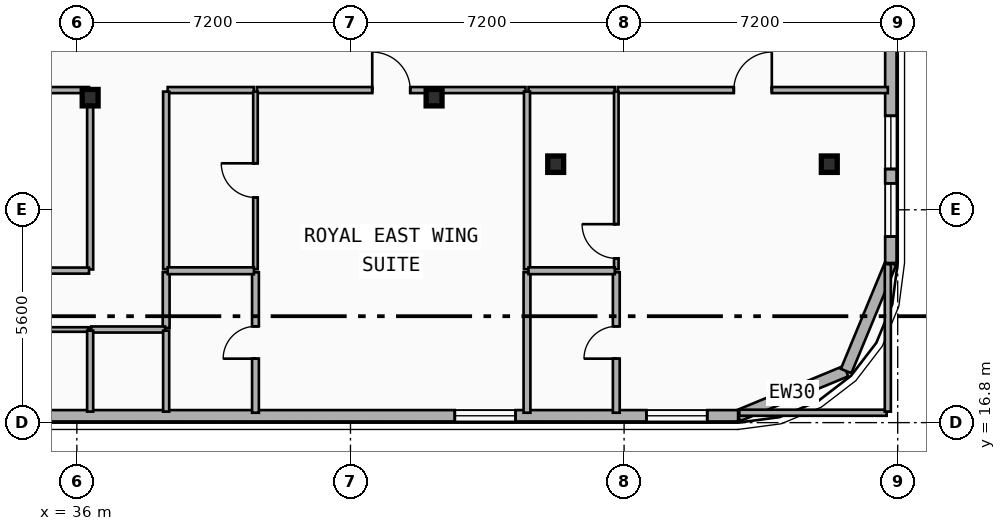
"""IFC4 building model, lengths in metres.
Left out: names, types, materials, properties, quantities, classifications, styles, units other than length and angle.
Written with IfcOpenShell. Run it as: python <this file> out.ifc"""

import sys

from ifc_helpers import new_model, si_unit, direction, frame, frame_2d, origin, origin_2d, place, context, subcontext, project, spatial, rectangle, i_section, extrude, element, fill, save


model = new_model("IFC4")
c1 = context("Model", 3, precision=1e-05, world=origin(), true_north=direction((0.0, 1.0)))
c2 = subcontext(c1, "Body", "Model", "MODEL_VIEW")
j1 = project(units=[si_unit("LENGTHUNIT", "METRE"), si_unit("PLANEANGLEUNIT", "RADIAN")], contexts=[c1])
p1 = place(None, origin())
s1 = spatial("IfcSite", under=j1, at=p1, CompositionType="ELEMENT")
p2 = place(p1, origin())
s2 = spatial("IfcBuilding", under=s1, at=p2, CompositionType="ELEMENT")
p3 = place(p2, frame((0.0, 0.0, 129.3)))
s3 = spatial("IfcBuildingStorey", under=s2, at=p3, CompositionType="ELEMENT", Elevation=129.3)
for number, where, z_axis, x_axis in (
    (1, (36.35, 25.35, 0.0), (0.0, 0.0, 1.0), (1.0, 0.0, 0.0)),
    (2, (45.4, 25.35, 0.0), (0.0, 0.0, 1.0), (1.0, 0.0, 0.0)),
    (3, (48.6, 23.6, 0.0), (0.0, 0.0, 1.0), (1.0, 0.0, 0.0)),
    (4, (55.8, 23.6, 0.0), (0.0, 0.0, 1.0), (1.0, 0.0, 0.0)),
):
    element("IfcColumn", number, at=place(p3, frame(where, z_axis=z_axis, x_axis=x_axis)), inside=s3, PredefinedType="COLUMN", context=c2, shape_type="SweptSolid", body=[
        extrude(i_section(OverallWidth=0.418, OverallDepth=0.432, WebThickness=0.035, FlangeThickness=0.056, FilletRadius=0.015, at=origin_2d()), origin(), (0.0, 0.0, 1.0), 3.6),
    ])
p4 = place(p3, frame((56.243, 18.157, 0.0), z_axis=(0.0, 0.0, 1.0), x_axis=(-0.923882414032, -0.382676475685, 0.0)))
e5 = element("IfcWall", 5, at=p4, inside=s3, PredefinedType="SOLIDWALL", context=c2, shape_type="SweptSolid", body=[
    extrude(rectangle(XDim=3.077, YDim=0.3, at=frame_2d((1.539, 0.0))), origin(), (0.0, 0.0, 1.0), 3.28),
])
p5 = place(p3, frame((57.42, 21.0, 0.0), z_axis=(0.0, 0.0, 1.0), x_axis=(-0.382636798336, -0.92389884758, 0.0)))
e6 = element("IfcWall", 6, at=p5, inside=s3, PredefinedType="SOLIDWALL", context=c2, shape_type="SweptSolid", body=[
    extrude(rectangle(XDim=3.077, YDim=0.3, at=frame_2d((1.538, 0.0))), origin(), (0.0, 0.0, 1.0), 3.28),
])
p6 = place(p3, frame((57.42, 39.0, 0.0), z_axis=(0.0, 0.0, 1.0), x_axis=(0.0, -1.0, 0.0)))
e7 = element("IfcWall", 7, at=p6, inside=s3, PredefinedType="SOLIDWALL", context=c2, shape_type="SweptSolid", body=[
    extrude(rectangle(XDim=18.0, YDim=0.3, at=frame_2d((9.0, 0.0))), origin(), (0.0, 0.0, 1.0), 3.28),
])
p7 = place(p6, frame((8.882, 0.0, 0.65)))
e8 = element("IfcOpeningElement", 8, at=p7, cuts=e7, PredefinedType="OPENING", context=c2, shape_type="SweptSolid", body=[
    extrude(rectangle(XDim=1.4, YDim=1.8, at=frame_2d((0.7, 0.9))), frame((0.0, 0.16, 0.0), z_axis=(0.0, -1.0, 0.0), x_axis=(1.0, 0.0, 0.0)), (0.0, 0.0, 1.0), 0.32),
])
p8 = place(p6, frame((3.621, 0.0, 0.65)))
e9 = element("IfcOpeningElement", 9, at=p8, cuts=e7, PredefinedType="OPENING", context=c2, shape_type="SweptSolid", body=[
    extrude(rectangle(XDim=1.4, YDim=1.8, at=frame_2d((0.7, 0.9))), frame((0.0, 0.16, 0.0), z_axis=(0.0, -1.0, 0.0), x_axis=(1.0, 0.0, 0.0)), (0.0, 0.0, 1.0), 0.32),
])
p9 = place(p6, frame((14.127, 0.0, 0.65)))
e10 = element("IfcOpeningElement", 10, at=p9, cuts=e7, PredefinedType="OPENING", context=c2, shape_type="SweptSolid", body=[
    extrude(rectangle(XDim=1.4, YDim=1.8, at=frame_2d((0.7, 0.9))), frame((0.0, 0.16, 0.0), z_axis=(0.0, -1.0, 0.0), x_axis=(1.0, 0.0, 0.0)), (0.0, 0.0, 1.0), 0.32),
])
p10 = place(p6, frame((15.903, 0.0, 0.65)))
e11 = element("IfcOpeningElement", 11, at=p10, cuts=e7, PredefinedType="OPENING", context=c2, shape_type="SweptSolid", body=[
    extrude(rectangle(XDim=1.4, YDim=1.8, at=frame_2d((0.7, 0.9))), frame((0.0, 0.16, 0.0), z_axis=(0.0, -1.0, 0.0), x_axis=(1.0, 0.0, 0.0)), (0.0, 0.0, 1.0), 0.32),
])
p11 = place(p3, frame((53.4, 16.98, 0.0), z_axis=(0.0, 0.0, 1.0), x_axis=(-1.0, 0.0, 0.0)))
e12 = element("IfcWall", 12, at=p11, inside=s3, PredefinedType="SOLIDWALL", context=c2, shape_type="SweptSolid", body=[
    extrude(rectangle(XDim=49.2, YDim=0.3, at=frame_2d((24.6, 0.0))), origin(), (0.0, 0.0, 1.0), 3.28),
])
p12 = place(p11, frame((43.85, 0.0, 0.65)))
e13 = element("IfcOpeningElement", 13, at=p12, cuts=e12, PredefinedType="OPENING", context=c2, shape_type="SweptSolid", body=[
    extrude(rectangle(XDim=1.6, YDim=1.95, at=frame_2d((0.8, 0.975))), frame((0.0, 0.16, 0.0), z_axis=(0.0, -1.0, 0.0), x_axis=(1.0, 0.0, 0.0)), (0.0, 0.0, 1.0), 0.32),
])
p13 = place(p11, frame((38.628, 0.0, 0.65)))
e14 = element("IfcOpeningElement", 14, at=p13, cuts=e12, PredefinedType="OPENING", context=c2, shape_type="SweptSolid", body=[
    extrude(rectangle(XDim=1.6, YDim=1.95, at=frame_2d((0.8, 0.975))), frame((0.0, 0.16, 0.0), z_axis=(0.0, -1.0, 0.0), x_axis=(1.0, 0.0, 0.0)), (0.0, 0.0, 1.0), 0.32),
])
p14 = place(p11, frame((28.7, 0.0, 0.8)))
e15 = element("IfcOpeningElement", 15, at=p14, cuts=e12, PredefinedType="OPENING", context=c2, shape_type="SweptSolid", body=[
    extrude(rectangle(XDim=1.6, YDim=1.95, at=frame_2d((0.8, 0.975))), frame((0.0, 0.16, 0.0), z_axis=(0.0, -1.0, 0.0), x_axis=(1.0, 0.0, 0.0)), (0.0, 0.0, 1.0), 0.32),
])
p15 = place(p11, frame((5.855, 0.0, 0.34)))
e16 = element("IfcOpeningElement", 16, at=p15, cuts=e12, PredefinedType="OPENING", context=c2, shape_type="SweptSolid", body=[
    extrude(rectangle(XDim=1.6, YDim=1.95, at=frame_2d((0.8, 0.975))), frame((0.0, 0.16, 0.0), z_axis=(0.0, -1.0, 0.0), x_axis=(1.0, 0.0, 0.0)), (0.0, 0.0, 1.0), 0.32),
])
p16 = place(p11, frame((0.812, 0.0, 0.65)))
e17 = element("IfcOpeningElement", 17, at=p16, cuts=e12, PredefinedType="OPENING", context=c2, shape_type="SweptSolid", body=[
    extrude(rectangle(XDim=1.6, YDim=1.95, at=frame_2d((0.8, 0.975))), frame((0.0, 0.16, 0.0), z_axis=(0.0, -1.0, 0.0), x_axis=(1.0, 0.0, 0.0)), (0.0, 0.0, 1.0), 0.32),
])
p17 = place(p3, frame((40.74, 25.55, 0.0), z_axis=(0.0, 0.0, 1.0), x_axis=(1.0, 0.0, 0.0)))
e18 = element("IfcWall", 18, at=p17, inside=s3, PredefinedType="PARTITIONING", context=c2, shape_type="SweptSolid", body=[
    extrude(rectangle(XDim=7.065, YDim=0.16, at=frame_2d((3.532, 0.0))), origin(), (0.0, 0.0, 1.0), 2.446),
])
p18 = place(p17, frame((3.032, 0.0, 0.0)))
e19 = element("IfcOpeningElement", 19, at=p18, cuts=e18, PredefinedType="OPENING", context=c2, shape_type="SweptSolid", body=[
    extrude(rectangle(XDim=1.0, YDim=2.15, at=frame_2d((0.5, 1.075))), frame((0.0, 0.09, 0.0), z_axis=(0.0, -1.0, 0.0), x_axis=(1.0, 0.0, 0.0)), (0.0, 0.0, 1.0), 0.18),
])
p19 = place(p3, frame((38.39, 25.55, 0.0), z_axis=(0.0, 0.0, 1.0), x_axis=(1.0, 0.0, 0.0)))
e20 = element("IfcWall", 20, at=p19, inside=s3, PredefinedType="PARTITIONING", context=c2, shape_type="SweptSolid", body=[
    extrude(rectangle(XDim=2.27, YDim=0.16, at=frame_2d((1.135, 0.0))), origin(), (0.0, 0.0, 1.0), 3.28),
])
p20 = place(p3, frame((50.235, 25.55, 0.0), z_axis=(0.0, 0.0, 1.0), x_axis=(1.0, 0.0, 0.0)))
e21 = element("IfcWall", 21, at=p20, inside=s3, PredefinedType="PARTITIONING", context=c2, shape_type="SweptSolid", body=[
    extrude(rectangle(XDim=7.105, YDim=0.16, at=frame_2d((3.552, 0.0))), origin(), (0.0, 0.0, 1.0), 2.61),
])
p21 = place(p20, frame((3.052, 0.0, 0.0)))
e22 = element("IfcOpeningElement", 22, at=p21, cuts=e21, PredefinedType="OPENING", context=c2, shape_type="SweptSolid", body=[
    extrude(rectangle(XDim=1.0, YDim=2.15, at=frame_2d((0.5, 1.075))), frame((0.0, 0.09, 0.0), z_axis=(0.0, -1.0, 0.0), x_axis=(1.0, 0.0, 0.0)), (0.0, 0.0, 1.0), 0.18),
])
p22 = place(p3, frame((47.885, 25.55, 0.0), z_axis=(0.0, 0.0, 1.0), x_axis=(1.0, 0.0, 0.0)))
e23 = element("IfcWall", 23, at=p22, inside=s3, PredefinedType="PARTITIONING", context=c2, shape_type="SweptSolid", body=[
    extrude(rectangle(XDim=2.27, YDim=0.16, at=frame_2d((1.135, 0.0))), origin(), (0.0, 0.0, 1.0), 2.61),
])
p23 = place(p3, frame((38.35, 19.29, 0.0), z_axis=(0.0, 0.0, 1.0), x_axis=(0.0, 1.0, 0.0)))
e24 = element("IfcWall", 24, at=p23, inside=s3, PredefinedType="PLUMBINGWALL", context=c2, shape_type="SweptSolid", body=[
    extrude(rectangle(XDim=1.466, YDim=0.18, at=frame_2d((0.733, 0.0))), origin(), (0.0, 0.0, 1.0), 2.87),
])
p24 = place(p3, frame((38.35, 20.836, 0.0), z_axis=(0.0, 0.0, 1.0), x_axis=(0.0, 1.0, 0.0)))
e25 = element("IfcWall", 25, at=p24, inside=s3, PredefinedType="PARTITIONING", context=c2, shape_type="SweptSolid", body=[
    extrude(rectangle(XDim=4.674, YDim=0.16, at=frame_2d((2.337, 0.0))), origin(), (0.0, 0.0, 1.0), 2.86),
])
p25 = place(p3, frame((22.84, 19.25, 0.0), z_axis=(0.0, 0.0, 1.0), x_axis=(1.0, 0.0, 0.0)))
e26 = element("IfcWall", 26, at=p25, inside=s3, PredefinedType="PARTITIONING", context=c2, shape_type="SweptSolid", body=[
    extrude(rectangle(XDim=13.47, YDim=0.12, at=frame_2d((6.735, 0.0))), origin(), (0.0, 0.0, 1.0), 2.446),
])
p26 = place(p25, frame((6.285, 0.0, 0.0)))
e27 = element("IfcOpeningElement", 27, at=p26, cuts=e26, PredefinedType="OPENING", context=c2, shape_type="SweptSolid", body=[
    extrude(rectangle(XDim=0.9, YDim=2.1, at=frame_2d((0.45, 1.05))), frame((0.0, 0.07, 0.0), z_axis=(0.0, -1.0, 0.0), x_axis=(1.0, 0.0, 0.0)), (0.0, 0.0, 1.0), 0.14),
])
p27 = place(p3, frame((40.7, 17.06, 0.0), z_axis=(0.0, 0.0, 1.0), x_axis=(0.0, 1.0, 0.0)))
e28 = element("IfcWall", 28, at=p27, inside=s3, PredefinedType="PLUMBINGWALL", context=c2, shape_type="SweptSolid", body=[
    extrude(rectangle(XDim=3.696, YDim=0.18, at=frame_2d((1.848, 0.0))), origin(), (0.0, 0.0, 1.0), 2.86),
])
p28 = place(p27, frame((1.423, 0.0, 0.0)))
e29 = element("IfcOpeningElement", 29, at=p28, cuts=e28, PredefinedType="OPENING", context=c2, shape_type="SweptSolid", body=[
    extrude(rectangle(XDim=0.85, YDim=2.1, at=frame_2d((0.425, 1.05))), frame((0.0, 0.1, 0.0), z_axis=(0.0, -1.0, 0.0), x_axis=(1.0, 0.0, 0.0)), (0.0, 0.0, 1.0), 0.2),
])
p29 = place(p3, frame((40.7, 20.836, 0.0), z_axis=(0.0, 0.0, 1.0), x_axis=(0.0, 1.0, 0.0)))
e30 = element("IfcWall", 30, at=p29, inside=s3, PredefinedType="PARTITIONING", context=c2, shape_type="SweptSolid", body=[
    extrude(rectangle(XDim=4.674, YDim=0.12, at=frame_2d((2.337, 0.0))), origin(), (0.0, 0.0, 1.0), 2.86),
])
p30 = place(p29, frame((1.887, 0.0, 0.0)))
e31 = element("IfcOpeningElement", 31, at=p30, cuts=e30, PredefinedType="OPENING", context=c2, shape_type="SweptSolid", body=[
    extrude(rectangle(XDim=0.9, YDim=2.1, at=frame_2d((0.45, 1.05))), frame((0.0, 0.07, 0.0), z_axis=(0.0, -1.0, 0.0), x_axis=(1.0, 0.0, 0.0)), (0.0, 0.0, 1.0), 0.14),
])
p31 = place(p3, frame((47.845, 17.06, 0.0), z_axis=(0.0, 0.0, 1.0), x_axis=(0.0, 1.0, 0.0)))
e32 = element("IfcWall", 32, at=p31, inside=s3, PredefinedType="PLUMBINGWALL", context=c2, shape_type="SweptSolid", body=[
    extrude(rectangle(XDim=3.696, YDim=0.18, at=frame_2d((1.848, 0.0))), origin(), (0.0, 0.0, 1.0), 2.96),
])
p32 = place(p3, frame((47.845, 20.836, 0.0), z_axis=(0.0, 0.0, 1.0), x_axis=(0.0, 1.0, 0.0)))
e33 = element("IfcWall", 33, at=p32, inside=s3, PredefinedType="PARTITIONING", context=c2, shape_type="SweptSolid", body=[
    extrude(rectangle(XDim=4.674, YDim=0.16, at=frame_2d((2.337, 0.0))), origin(), (0.0, 0.0, 1.0), 2.76),
])
p33 = place(p3, frame((38.39, 20.796, 0.0), z_axis=(0.0, 0.0, 1.0), x_axis=(1.0, 0.0, 0.0)))
e34 = element("IfcWall", 34, at=p33, inside=s3, PredefinedType="PLUMBINGWALL", context=c2, shape_type="SweptSolid", body=[
    extrude(rectangle(XDim=2.27, YDim=0.18, at=frame_2d((1.135, 0.0))), origin(), (0.0, 0.0, 1.0), 2.87),
])
p34 = place(p3, frame((50.195, 17.06, 0.0), z_axis=(0.0, 0.0, 1.0), x_axis=(0.0, 1.0, 0.0)))
e35 = element("IfcWall", 35, at=p34, inside=s3, PredefinedType="PLUMBINGWALL", context=c2, shape_type="SweptSolid", body=[
    extrude(rectangle(XDim=3.696, YDim=0.18, at=frame_2d((1.848, 0.0))), origin(), (0.0, 0.0, 1.0), 2.61),
])
p35 = place(p34, frame((1.423, 0.0, 0.0)))
e36 = element("IfcOpeningElement", 36, at=p35, cuts=e35, PredefinedType="OPENING", context=c2, shape_type="SweptSolid", body=[
    extrude(rectangle(XDim=0.85, YDim=2.1, at=frame_2d((0.425, 1.05))), frame((0.0, 0.1, 0.0), z_axis=(0.0, -1.0, 0.0), x_axis=(1.0, 0.0, 0.0)), (0.0, 0.0, 1.0), 0.2),
])
p36 = place(p3, frame((50.195, 20.836, 0.0), z_axis=(0.0, 0.0, 1.0), x_axis=(0.0, 1.0, 0.0)))
e37 = element("IfcWall", 37, at=p36, inside=s3, PredefinedType="PARTITIONING", context=c2, shape_type="SweptSolid", body=[
    extrude(rectangle(XDim=4.674, YDim=0.12, at=frame_2d((2.337, 0.0))), origin(), (0.0, 0.0, 1.0), 2.61),
])
p37 = place(p36, frame((0.286, 0.0, 0.0)))
e38 = element("IfcOpeningElement", 38, at=p37, cuts=e37, PredefinedType="OPENING", context=c2, shape_type="SweptSolid", body=[
    extrude(rectangle(XDim=0.9, YDim=2.1, at=frame_2d((0.45, 1.05))), frame((0.0, 0.07, 0.0), z_axis=(0.0, -1.0, 0.0), x_axis=(1.0, 0.0, 0.0)), (0.0, 0.0, 1.0), 0.14),
])
p38 = place(p3, frame((47.885, 20.796, 0.0), z_axis=(0.0, 0.0, 1.0), x_axis=(1.0, 0.0, 0.0)))
e39 = element("IfcWall", 39, at=p38, inside=s3, PredefinedType="PLUMBINGWALL", context=c2, shape_type="SweptSolid", body=[
    extrude(rectangle(XDim=2.27, YDim=0.18, at=frame_2d((1.135, 0.0))), origin(), (0.0, 0.0, 1.0), 2.61),
])
p39 = place(p3, frame((22.83, 25.55, 0.0), z_axis=(0.0, 0.0, 1.0), x_axis=(1.0, 0.0, 0.0)))
e40 = element("IfcWall", 40, at=p39, inside=s3, PredefinedType="PARTITIONING", context=c2, shape_type="SweptSolid", body=[
    extrude(rectangle(XDim=13.49, YDim=0.16, at=frame_2d((6.745, 0.0))), origin(), (0.0, 0.0, 1.0), 2.446),
])
p40 = place(p3, frame((36.38, 19.25, 0.0), z_axis=(0.0, 0.0, 1.0), x_axis=(1.0, 0.0, 0.0)))
e41 = element("IfcWall", 41, at=p40, inside=s3, PredefinedType="PARTITIONING", context=c2, shape_type="SweptSolid", body=[
    extrude(rectangle(XDim=1.94, YDim=0.16, at=frame_2d((0.97, 0.0))), origin(), (0.0, 0.0, 1.0), 2.446),
])
p41 = place(p3, frame((36.35, 20.83, 0.0), z_axis=(0.0, 0.0, 1.0), x_axis=(0.0, 1.0, 0.0)))
e42 = element("IfcWall", 42, at=p41, inside=s3, PredefinedType="PARTITIONING", context=c2, shape_type="SweptSolid", body=[
    extrude(rectangle(XDim=4.69, YDim=0.16, at=frame_2d((2.345, 0.0))), origin(), (0.0, 0.0, 1.0), 2.446),
])
p42 = place(p3, frame((34.48, 20.8, 0.0), z_axis=(0.0, 0.0, 1.0), x_axis=(1.0, 0.0, 0.0)))
e43 = element("IfcWall", 43, at=p42, inside=s3, PredefinedType="PARTITIONING", context=c2, shape_type="SweptSolid", body=[
    extrude(rectangle(XDim=1.84, YDim=0.16, at=frame_2d((0.92, 0.0))), origin(), (0.0, 0.0, 1.0), 2.446),
])
p43 = place(p3, frame((36.35, 17.09, 0.0), z_axis=(0.0, 0.0, 1.0), x_axis=(0.0, 1.0, 0.0)))
e44 = element("IfcWall", 44, at=p43, inside=s3, PredefinedType="PARTITIONING", context=c2, shape_type="SweptSolid", body=[
    extrude(rectangle(XDim=2.13, YDim=0.16, at=frame_2d((1.065, 0.0))), origin(), (0.0, 0.0, 1.0), 2.446),
])
p44 = place(p3, frame((38.35, 17.09, 0.0), z_axis=(0.0, 0.0, 1.0), x_axis=(0.0, 1.0, 0.0)))
e45 = element("IfcWall", 45, at=p44, inside=s3, PredefinedType="PARTITIONING", context=c2, shape_type="SweptSolid", body=[
    extrude(rectangle(XDim=2.13, YDim=0.16, at=frame_2d((1.065, 0.0))), origin(), (0.0, 0.0, 1.0), 2.86),
])
p45 = place(p3, frame((53.43, 17.06, 0.0), z_axis=(0.0, 0.0, 1.0), x_axis=(1.0, 0.0, 0.0)))
e46 = element("IfcWall", 46, at=p45, inside=s3, PredefinedType="PARTITIONING", context=c2, shape_type="SweptSolid", body=[
    extrude(rectangle(XDim=3.88, YDim=0.16, at=frame_2d((1.94, 0.0))), origin(), (0.0, 0.0, 1.0), 2.76),
])
p46 = place(p3, frame((57.34, 17.09, 0.0), z_axis=(0.0, 0.0, 1.0), x_axis=(0.0, 1.0, 0.0)))
e47 = element("IfcWall", 47, at=p46, inside=s3, PredefinedType="PARTITIONING", context=c2, shape_type="SweptSolid", body=[
    extrude(rectangle(XDim=3.88, YDim=0.16, at=frame_2d((1.94, 0.0))), origin(), (0.0, 0.0, 1.0), 3.28),
])
p47 = place(p9, origin())
e48 = element("IfcWindow", 48, at=p47, inside=s3, PartitioningType="SINGLE_PANEL", PredefinedType="WINDOW", context=c2, shape_type="SweptSolid", body=[
    extrude(rectangle(XDim=1.4, YDim=1.8, at=frame_2d((0.7, 0.9))), frame((0.0, 0.03, 0.0), z_axis=(0.0, -1.0, 0.0), x_axis=(1.0, 0.0, 0.0)), (0.0, 0.0, 1.0), 0.06),
])
fill(e10, e48)
p48 = place(p10, origin())
e49 = element("IfcWindow", 49, at=p48, inside=s3, PartitioningType="SINGLE_PANEL", PredefinedType="WINDOW", context=c2, shape_type="SweptSolid", body=[
    extrude(rectangle(XDim=1.4, YDim=1.8, at=frame_2d((0.7, 0.9))), frame((0.0, 0.03, 0.0), z_axis=(0.0, -1.0, 0.0), x_axis=(1.0, 0.0, 0.0)), (0.0, 0.0, 1.0), 0.06),
])
fill(e11, e49)
p49 = place(p15, origin())
e50 = element("IfcWindow", 50, at=p49, inside=s3, PartitioningType="SINGLE_PANEL", PredefinedType="WINDOW", context=c2, shape_type="SweptSolid", body=[
    extrude(rectangle(XDim=1.6, YDim=1.95, at=frame_2d((0.8, 0.975))), frame((0.0, 0.03, 0.0), z_axis=(0.0, -1.0, 0.0), x_axis=(1.0, 0.0, 0.0)), (0.0, 0.0, 1.0), 0.06),
])
fill(e16, e50)
p50 = place(p16, origin())
e51 = element("IfcWindow", 51, at=p50, inside=s3, PartitioningType="SINGLE_PANEL", PredefinedType="WINDOW", context=c2, shape_type="SweptSolid", body=[
    extrude(rectangle(XDim=1.6, YDim=1.95, at=frame_2d((0.8, 0.975))), frame((0.0, 0.03, 0.0), z_axis=(0.0, -1.0, 0.0), x_axis=(1.0, 0.0, 0.0)), (0.0, 0.0, 1.0), 0.06),
])
fill(e17, e51)
p51 = place(p18, origin())
e52 = element("IfcDoor", 52, at=p51, inside=s3, OperationType="SINGLE_SWING_LEFT", PredefinedType="DOOR", context=c2, shape_type="SweptSolid", body=[
    extrude(rectangle(XDim=1.0, YDim=2.15, at=frame_2d((0.5, 1.075))), frame((0.0, 0.025, 0.0), z_axis=(0.0, -1.0, 0.0), x_axis=(1.0, 0.0, 0.0)), (0.0, 0.0, 1.0), 0.05),
])
fill(e19, e52)
p52 = place(p21, origin())
e53 = element("IfcDoor", 53, at=p52, inside=s3, OperationType="SINGLE_SWING_RIGHT", PredefinedType="DOOR", context=c2, shape_type="SweptSolid", body=[
    extrude(rectangle(XDim=1.0, YDim=2.15, at=frame_2d((0.5, 1.075))), frame((0.0, 0.025, 0.0), z_axis=(0.0, -1.0, 0.0), x_axis=(1.0, 0.0, 0.0)), (0.0, 0.0, 1.0), 0.05),
])
fill(e22, e53)
p53 = place(p28, origin())
e54 = element("IfcDoor", 54, at=p53, inside=s3, OperationType="SINGLE_SWING_LEFT", PredefinedType="DOOR", context=c2, shape_type="SweptSolid", body=[
    extrude(rectangle(XDim=0.85, YDim=2.1, at=frame_2d((0.425, 1.05))), frame((0.0, 0.025, 0.0), z_axis=(0.0, -1.0, 0.0), x_axis=(1.0, 0.0, 0.0)), (0.0, 0.0, 1.0), 0.05),
])
fill(e29, e54)
p54 = place(p30, origin())
e55 = element("IfcDoor", 55, at=p54, inside=s3, OperationType="SINGLE_SWING_RIGHT", PredefinedType="DOOR", context=c2, shape_type="SweptSolid", body=[
    extrude(rectangle(XDim=0.9, YDim=2.1, at=frame_2d((0.45, 1.05))), frame((0.0, 0.025, 0.0), z_axis=(0.0, -1.0, 0.0), x_axis=(1.0, 0.0, 0.0)), (0.0, 0.0, 1.0), 0.05),
])
fill(e31, e55)
p55 = place(p35, origin())
e56 = element("IfcDoor", 56, at=p55, inside=s3, OperationType="SINGLE_SWING_LEFT", PredefinedType="DOOR", context=c2, shape_type="SweptSolid", body=[
    extrude(rectangle(XDim=0.85, YDim=2.1, at=frame_2d((0.425, 1.05))), frame((0.0, 0.025, 0.0), z_axis=(0.0, -1.0, 0.0), x_axis=(1.0, 0.0, 0.0)), (0.0, 0.0, 1.0), 0.05),
])
fill(e36, e56)
p56 = place(p37, origin())
e57 = element("IfcDoor", 57, at=p56, inside=s3, OperationType="SINGLE_SWING_RIGHT", PredefinedType="DOOR", context=c2, shape_type="SweptSolid", body=[
    extrude(rectangle(XDim=0.9, YDim=2.1, at=frame_2d((0.45, 1.05))), frame((0.0, 0.025, 0.0), z_axis=(0.0, -1.0, 0.0), x_axis=(1.0, 0.0, 0.0)), (0.0, 0.0, 1.0), 0.05),
])
fill(e38, e57)
save(model, sys.argv[1])
